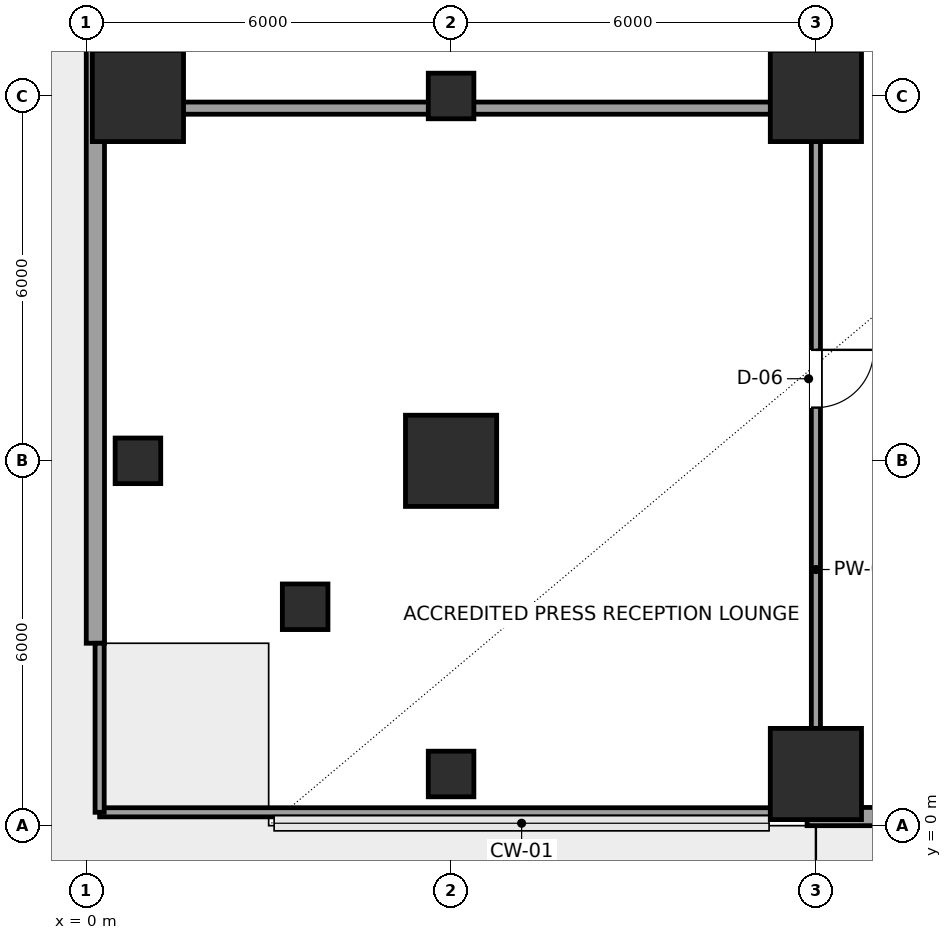
"""IFC4 building model, lengths in metres.
Left out: names, types, materials, properties, quantities, classifications, styles, units other than length and angle.
Written with IfcOpenShell. Run it as: python <this file> out.ifc"""

import sys

from ifc_helpers import new_model, si_unit, direction, frame, frame_2d, origin, origin_2d, place, context, subcontext, project, spatial, rectangle, hollow_rectangle, extrude, element, fill, save


model = new_model("IFC4")
c1 = context("Model", 3, precision=1e-05, world=origin(), true_north=direction((0.0, 1.0)))
c2 = subcontext(c1, "Body", "Model", "MODEL_VIEW")
j1 = project(units=[si_unit("LENGTHUNIT", "METRE"), si_unit("PLANEANGLEUNIT", "RADIAN")], contexts=[c1])
p1 = place(None, origin())
s1 = spatial("IfcSite", under=j1, at=p1, CompositionType="ELEMENT")
p2 = place(p1, origin())
s2 = spatial("IfcBuilding", under=s1, at=p2, CompositionType="ELEMENT")
p3 = place(p2, origin())
s3 = spatial("IfcBuildingStorey", under=s2, at=p3, CompositionType="ELEMENT", Elevation=0.0)
for number, where, z_axis, x_axis in (
    (1, (3.6, 3.6, 0.0), (0.0, 0.0, 1.0), (1.0, 0.0, 0.0)),
    (2, (0.85, 6.0, 0.0), (0.0, 0.0, 1.0), (1.0, 0.0, 0.0)),
):
    element("IfcColumn", number, at=place(p3, frame(where, z_axis=z_axis, x_axis=x_axis)), inside=s3, PredefinedType="COLUMN", context=c2, shape_type="SweptSolid", body=[
        extrude(hollow_rectangle(XDim=0.75, YDim=0.75, WallThickness=0.035, InnerFilletRadius=0.035, OuterFilletRadius=0.05, at=origin_2d()), origin(), (0.0, 0.0, 1.0), 5.7),
    ])
p4 = place(p3, frame((0.85, 12.0, 0.0), z_axis=(0.0, 0.0, 1.0), x_axis=(1.0, 0.0, 0.0)))
e3 = element("IfcColumn", 3, at=p4, inside=s3, PredefinedType="COLUMN", context=c2, shape_type="SweptSolid", body=[
    extrude(rectangle(XDim=1.5, YDim=1.5, at=origin_2d()), origin(), (0.0, 0.0, 1.0), 5.7),
])
p5 = place(p3, frame((6.0, 0.85, 0.0), z_axis=(0.0, 0.0, 1.0), x_axis=(1.0, 0.0, 0.0)))
e4 = element("IfcColumn", 4, at=p5, inside=s3, PredefinedType="COLUMN", context=c2, shape_type="SweptSolid", body=[
    extrude(hollow_rectangle(XDim=0.75, YDim=0.75, WallThickness=0.035, InnerFilletRadius=0.035, OuterFilletRadius=0.05, at=origin_2d()), origin(), (0.0, 0.0, 1.0), 5.7),
])
p6 = place(p3, frame((6.0, 6.0, 0.0), z_axis=(0.0, 0.0, 1.0), x_axis=(1.0, 0.0, 0.0)))
e5 = element("IfcColumn", 5, at=p6, inside=s3, PredefinedType="COLUMN", context=c2, shape_type="SweptSolid", body=[
    extrude(rectangle(XDim=1.5, YDim=1.5, at=origin_2d()), origin(), (0.0, 0.0, 1.0), 5.7),
])
p7 = place(p3, frame((6.0, 12.0, 0.0), z_axis=(0.0, 0.0, 1.0), x_axis=(1.0, 0.0, 0.0)))
e6 = element("IfcColumn", 6, at=p7, inside=s3, PredefinedType="COLUMN", context=c2, shape_type="SweptSolid", body=[
    extrude(hollow_rectangle(XDim=0.75, YDim=0.75, WallThickness=0.035, InnerFilletRadius=0.035, OuterFilletRadius=0.05, at=origin_2d()), origin(), (0.0, 0.0, 1.0), 5.7),
])
for number, where, z_axis, x_axis in (
    (7, (12.0, 0.85, 0.0), (0.0, 0.0, 1.0), (1.0, 0.0, 0.0)),
    (8, (12.0, 12.0, 0.0), (0.0, 0.0, 1.0), (1.0, 0.0, 0.0)),
):
    element("IfcColumn", number, at=place(p3, frame(where, z_axis=z_axis, x_axis=x_axis)), inside=s3, PredefinedType="COLUMN", context=c2, shape_type="SweptSolid", body=[
        extrude(rectangle(XDim=1.5, YDim=1.5, at=origin_2d()), origin(), (0.0, 0.0, 1.0), 5.7),
    ])
p8 = place(p3, frame((24.0, 0.15, 0.0), z_axis=(0.0, 0.0, 1.0), x_axis=(-1.0, 0.0, 0.0)))
e9 = element("IfcWall", 9, at=p8, inside=s3, PredefinedType="SOLIDWALL", context=c2, shape_type="SweptSolid", body=[
    extrude(rectangle(XDim=12.145, YDim=0.3, at=frame_2d((6.073, 0.0))), origin(), (0.0, 0.0, 1.0), 5.4),
])
p9 = place(p8, frame((1.9, 0.0, 0.0)))
e10 = element("IfcOpeningElement", 10, at=p9, cuts=e9, PredefinedType="OPENING", context=c2, shape_type="SweptSolid", body=[
    extrude(rectangle(XDim=2.2, YDim=2.6, at=frame_2d((1.1, 1.3))), frame((0.0, 0.16, 0.0), z_axis=(0.0, -1.0, 0.0), x_axis=(1.0, 0.0, 0.0)), (0.0, 0.0, 1.0), 0.32),
])
p10 = place(p8, frame((7.9, 0.0, 0.0)))
e11 = element("IfcOpeningElement", 11, at=p10, cuts=e9, PredefinedType="OPENING", context=c2, shape_type="SweptSolid", body=[
    extrude(rectangle(XDim=2.2, YDim=2.6, at=frame_2d((1.1, 1.3))), frame((0.0, 0.16, 0.0), z_axis=(0.0, -1.0, 0.0), x_axis=(1.0, 0.0, 0.0)), (0.0, 0.0, 1.0), 0.32),
])
p11 = place(p3, frame((0.15, 3.0, 0.0), z_axis=(0.0, 0.0, 1.0), x_axis=(0.0, 1.0, 0.0)))
e12 = element("IfcWall", 12, at=p11, inside=s3, PredefinedType="SOLIDWALL", context=c2, shape_type="SweptSolid", body=[
    extrude(rectangle(XDim=26.295, YDim=0.3, at=frame_2d((13.147, 0.0))), origin(), (0.0, 0.0, 1.0), 5.4),
])
p12 = place(p11, frame((10.2, 0.0, 0.0)))
e13 = element("IfcOpeningElement", 13, at=p12, cuts=e12, PredefinedType="OPENING", context=c2, shape_type="SweptSolid", body=[
    extrude(rectangle(XDim=2.2, YDim=2.6, at=frame_2d((1.1, 1.3))), frame((0.0, 0.16, 0.0), z_axis=(0.0, -1.0, 0.0), x_axis=(1.0, 0.0, 0.0)), (0.0, 0.0, 1.0), 0.32),
])
p13 = place(p11, frame((17.5, 0.0, 0.0)))
e14 = element("IfcOpeningElement", 14, at=p13, cuts=e12, PredefinedType="OPENING", context=c2, shape_type="SweptSolid", body=[
    extrude(rectangle(XDim=1.1, YDim=2.2, at=frame_2d((0.55, 1.1))), frame((0.0, 0.16, 0.0), z_axis=(0.0, -1.0, 0.0), x_axis=(1.0, 0.0, 0.0)), (0.0, 0.0, 1.0), 0.32),
])
p14 = place(p11, frame((21.8, 0.0, 1.0)))
e15 = element("IfcOpeningElement", 15, at=p14, cuts=e12, PredefinedType="OPENING", context=c2, shape_type="SweptSolid", body=[
    extrude(rectangle(XDim=2.4, YDim=2.2, at=frame_2d((1.2, 1.1))), frame((0.0, 0.16, 0.0), z_axis=(0.0, -1.0, 0.0), x_axis=(1.0, 0.0, 0.0)), (0.0, 0.0, 1.0), 0.32),
])
p15 = place(p3, frame((12.0, 17.96, 0.0), z_axis=(0.0, 0.0, 1.0), x_axis=(0.0, -1.0, 0.0)))
e16 = element("IfcWall", 16, at=p15, inside=s3, PredefinedType="PARTITIONING", context=c2, shape_type="SweptSolid", body=[
    extrude(rectangle(XDim=17.74, YDim=0.15, at=frame_2d((8.87, 0.0))), origin(), (0.0, 0.0, 1.0), 3.492),
])
p16 = place(p15, frame((2.61, 0.0, 0.0)))
e17 = element("IfcOpeningElement", 17, at=p16, cuts=e16, PredefinedType="OPENING", context=c2, shape_type="SweptSolid", body=[
    extrude(rectangle(XDim=0.9, YDim=2.15, at=frame_2d((0.45, 1.075))), frame((0.0, 0.085, 0.0), z_axis=(0.0, -1.0, 0.0), x_axis=(1.0, 0.0, 0.0)), (0.0, 0.0, 1.0), 0.17),
])
p17 = place(p15, frame((10.135, 0.0, 0.0)))
e18 = element("IfcOpeningElement", 18, at=p17, cuts=e16, PredefinedType="OPENING", context=c2, shape_type="SweptSolid", body=[
    extrude(rectangle(XDim=0.95, YDim=2.15, at=frame_2d((0.475, 1.075))), frame((0.0, 0.085, 0.0), z_axis=(0.0, -1.0, 0.0), x_axis=(1.0, 0.0, 0.0)), (0.0, 0.0, 1.0), 0.17),
])
p18 = place(p3, frame((0.22, 11.8, 0.0), z_axis=(0.0, 0.0, 1.0), x_axis=(1.0, 0.0, 0.0)))
e19 = element("IfcWall", 19, at=p18, inside=s3, PredefinedType="SOLIDWALL", context=c2, shape_type="SweptSolid", body=[
    extrude(rectangle(XDim=11.78, YDim=0.2, at=frame_2d((5.89, 0.0))), origin(), (0.0, 0.0, 1.0), 4.742),
])
p19 = place(p3, frame((0.22, 0.22, 0.0), z_axis=(0.0, 0.0, 1.0), x_axis=(1.0, 0.0, 0.0)))
e20 = element("IfcWall", 20, at=p19, inside=s3, PredefinedType="PARTITIONING", context=c2, shape_type="SweptSolid", body=[
    extrude(rectangle(XDim=11.635, YDim=0.15, at=frame_2d((5.817, 0.0))), origin(), (0.0, 0.0, 1.0), 5.4),
])
p20 = place(p3, frame((0.22, 0.22, 0.0), z_axis=(0.0, 0.0, 1.0), x_axis=(0.0, 1.0, 0.0)))
e21 = element("IfcWall", 21, at=p20, inside=s3, PredefinedType="PARTITIONING", context=c2, shape_type="SweptSolid", body=[
    extrude(rectangle(XDim=2.78, YDim=0.15, at=frame_2d((1.39, 0.0))), origin(), (0.0, 0.0, 1.0), 5.4),
])
p21 = place(p17, origin())
e22 = element("IfcDoor", 22, at=p21, inside=s3, OperationType="SINGLE_SWING_LEFT", PredefinedType="DOOR", context=c2, shape_type="SweptSolid", body=[
    extrude(rectangle(XDim=0.95, YDim=2.15, at=frame_2d((0.475, 1.075))), frame((0.0, 0.025, 0.0), z_axis=(0.0, -1.0, 0.0), x_axis=(1.0, 0.0, 0.0)), (0.0, 0.0, 1.0), 0.05),
])
fill(e18, e22)
save(model, sys.argv[1])
